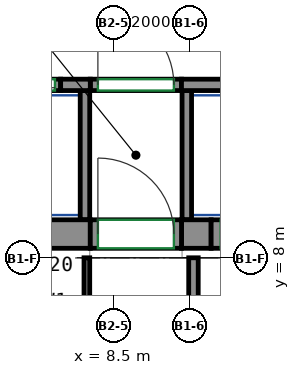
"""IFC4 building model, lengths in metres.
Left out: names, types, materials, properties, quantities, classifications, styles, units other than length and angle.
Written with IfcOpenShell. Run it as: python <this file> out.ifc"""

import sys

from ifc_helpers import new_model, si_unit, direction, frame, frame_2d, origin, place, context, subcontext, project, spatial, rectangle, extrude, source, transform, mapped, element, fill, save


model = new_model("IFC4")
c1 = context("Model", 3, precision=1e-05, world=origin(), true_north=direction((0.0, 1.0)))
c2 = subcontext(c1, "Body", "Model", "MODEL_VIEW")
j1 = project(units=[si_unit("LENGTHUNIT", "METRE"), si_unit("PLANEANGLEUNIT", "RADIAN")], contexts=[c1])
p1 = place(None, origin())
s1 = spatial("IfcSite", under=j1, at=p1, CompositionType="ELEMENT")
p2 = place(p1, origin())
s2 = spatial("IfcBuilding", under=s1, at=p2, CompositionType="ELEMENT")
p3 = place(p2, frame((0.0, 0.0, 203.3)))
s3 = spatial("IfcBuildingStorey", under=s2, at=p3, CompositionType="ELEMENT", Elevation=203.3)
m1 = source(origin(), c2, "Body", "SweptSolid", [
    extrude(rectangle(XDim=14.18, YDim=0.75, at=frame_2d((7.09, 0.0))), origin(), (0.0, 0.0, 1.0), 3.12),
])
p4 = place(p3, frame((-6.29, 8.625, 0.0), z_axis=(0.0, 0.0, 1.0), x_axis=(1.0, 0.0, 0.0)))
e1 = element("IfcWall", 1, at=p4, inside=s3, PredefinedType="SHEAR", context=c2, shape_type="MappedRepresentation", body=[
    mapped(m1, transform((0.0, 0.0, 0.0))),
])
m2 = source(origin(), c2, "Body", "SweptSolid", [
    extrude(rectangle(XDim=0.78, YDim=0.75, at=frame_2d((0.39, 0.0))), origin(), (0.0, 0.0, 1.0), 3.12),
])
p5 = place(p3, frame((10.29, 8.625, 0.0), z_axis=(0.0, 0.0, 1.0), x_axis=(1.0, 0.0, 0.0)))
e2 = element("IfcWall", 2, at=p5, inside=s3, PredefinedType="SHEAR", context=c2, shape_type="MappedRepresentation", body=[
    mapped(m2, transform((0.0, 0.0, 0.0))),
])
m3 = source(origin(), c2, "Body", "SweptSolid", [
    extrude(rectangle(XDim=0.78, YDim=0.3, at=frame_2d((0.39, 0.0))), origin(), (0.0, 0.0, 1.0), 3.12),
])
p6 = place(p3, frame((7.11, 12.55, 0.0), z_axis=(0.0, 0.0, 1.0), x_axis=(1.0, 0.0, 0.0)))
e3 = element("IfcWall", 3, at=p6, inside=s3, PredefinedType="SHEAR", context=c2, shape_type="MappedRepresentation", body=[
    mapped(m3, transform((0.0, 0.0, 0.0))),
])
m4 = source(origin(), c2, "Body", "SweptSolid", [
    extrude(rectangle(XDim=2.82, YDim=0.3, at=frame_2d((1.41, 0.0))), origin(), (0.0, 0.0, 1.0), 3.12),
])
p7 = place(p3, frame((10.29, 12.55, 0.0), z_axis=(0.0, 0.0, 1.0), x_axis=(1.0, 0.0, 0.0)))
e4 = element("IfcWall", 4, at=p7, inside=s3, PredefinedType="SHEAR", context=c2, shape_type="MappedRepresentation", body=[
    mapped(m4, transform((0.0, 0.0, 0.0))),
])
m5 = source(origin(), c2, "Body", "SweptSolid", [
    extrude(rectangle(XDim=1.4, YDim=0.3, at=frame_2d((0.7, 0.0))), origin(), (0.0, 0.0, 1.0), 3.12),
])
p8 = place(p3, frame((5.71, 12.55, 0.0), z_axis=(0.0, 0.0, 1.0), x_axis=(1.0, 0.0, 0.0)))
e5 = element("IfcWall", 5, at=p8, inside=s3, PredefinedType="PARTITIONING", context=c2, shape_type="MappedRepresentation", body=[
    mapped(m5, transform((0.0, 0.0, 0.0))),
])
p9 = place(p8, frame((0.15, 0.0, 0.0)))
e6 = element("IfcOpeningElement", 6, at=p9, cuts=e5, PredefinedType="OPENING", context=c2, shape_type="SweptSolid", body=[
    extrude(rectangle(XDim=1.1, YDim=2.1, at=frame_2d((0.55, 1.05))), frame((0.0, 0.16, 0.0), z_axis=(0.0, -1.0, 0.0), x_axis=(1.0, 0.0, 0.0)), (0.0, 0.0, 1.0), 0.32),
])
m6 = source(origin(), c2, "Body", "SweptSolid", [
    extrude(rectangle(XDim=2.4, YDim=0.3, at=frame_2d((1.2, 0.0))), origin(), (0.0, 0.0, 1.0), 3.12),
])
p10 = place(p3, frame((7.89, 12.55, 0.0), z_axis=(0.0, 0.0, 1.0), x_axis=(1.0, 0.0, 0.0)))
e7 = element("IfcWall", 7, at=p10, inside=s3, PredefinedType="PARTITIONING", context=c2, shape_type="MappedRepresentation", body=[
    mapped(m6, transform((0.0, 0.0, 0.0))),
])
p11 = place(p10, frame((0.2, 0.0, 0.0)))
e8 = element("IfcOpeningElement", 8, at=p11, cuts=e7, PredefinedType="OPENING", context=c2, shape_type="SweptSolid", body=[
    extrude(rectangle(XDim=2.0, YDim=2.1, at=frame_2d((1.0, 1.05))), frame((0.0, 0.16, 0.0), z_axis=(0.0, -1.0, 0.0), x_axis=(1.0, 0.0, 0.0)), (0.0, 0.0, 1.0), 0.32),
])
m7 = source(origin(), c2, "Body", "SweptSolid", [
    extrude(rectangle(XDim=2.65, YDim=0.25, at=frame_2d((1.325, 0.0))), origin(), (0.0, 0.0, 1.0), 3.12),
])
p12 = place(p3, frame((10.605, 5.35, 0.0), z_axis=(0.0, 0.0, 1.0), x_axis=(0.0, 1.0, 0.0)))
e9 = element("IfcWall", 9, at=p12, inside=s3, PredefinedType="PARTITIONING", context=c2, shape_type="MappedRepresentation", body=[
    mapped(m7, transform((0.0, 0.0, 0.0))),
])
m8 = source(origin(), c2, "Body", "SweptSolid", [
    extrude(rectangle(XDim=3.4, YDim=0.25, at=frame_2d((1.7, 0.0))), origin(), (0.0, 0.0, 1.0), 3.12),
])
for number, where, z_axis, x_axis in (
    (10, (10.43, 9.0, 0.0), (0.0, 0.0, 1.0), (0.0, 1.0, 0.0)),
    (11, (7.75, 9.0, 0.0), (0.0, 0.0, 1.0), (0.0, 1.0, 0.0)),
):
    element("IfcWall", number, at=place(p3, frame(where, z_axis=z_axis, x_axis=x_axis)), inside=s3, PredefinedType="PARTITIONING", context=c2, shape_type="MappedRepresentation", body=[
        mapped(m8, transform((0.0, 0.0, 0.0))),
    ])
m9 = source(origin(), c2, "Body", "SweptSolid", [
    extrude(rectangle(XDim=2.4, YDim=0.75, at=frame_2d((1.2, 0.0))), origin(), (0.0, 0.0, 1.0), 2.7),
])
p13 = place(p3, frame((7.89, 8.625, 0.0), z_axis=(0.0, 0.0, 1.0), x_axis=(1.0, 0.0, 0.0)))
e12 = element("IfcWall", 12, at=p13, inside=s3, PredefinedType="PARTITIONING", context=c2, shape_type="MappedRepresentation", body=[
    mapped(m9, transform((0.0, 0.0, 0.0))),
])
p14 = place(p13, frame((0.2, 0.0, 0.0)))
e13 = element("IfcOpeningElement", 13, at=p14, cuts=e12, PredefinedType="OPENING", context=c2, shape_type="SweptSolid", body=[
    extrude(rectangle(XDim=2.0, YDim=2.1, at=frame_2d((1.0, 1.05))), frame((0.0, 0.385, 0.0), z_axis=(0.0, -1.0, 0.0), x_axis=(1.0, 0.0, 0.0)), (0.0, 0.0, 1.0), 0.77),
])
m10 = source(origin(), c2, "Body", "SweptSolid", [
    extrude(rectangle(XDim=1.4, YDim=0.75, at=frame_2d((0.7, 0.0))), origin(), (0.0, 0.0, 1.0), 2.7),
])
p15 = place(p3, frame((11.07, 8.625, 0.0), z_axis=(0.0, 0.0, 1.0), x_axis=(1.0, 0.0, 0.0)))
e14 = element("IfcWall", 14, at=p15, inside=s3, PredefinedType="PARTITIONING", context=c2, shape_type="MappedRepresentation", body=[
    mapped(m10, transform((0.0, 0.0, 0.0))),
])
p16 = place(p15, frame((0.25, 0.0, 0.0)))
e15 = element("IfcOpeningElement", 15, at=p16, cuts=e14, PredefinedType="OPENING", context=c2, shape_type="SweptSolid", body=[
    extrude(rectangle(XDim=0.9, YDim=2.1, at=frame_2d((0.45, 1.05))), frame((0.0, 0.385, 0.0), z_axis=(0.0, -1.0, 0.0), x_axis=(1.0, 0.0, 0.0)), (0.0, 0.0, 1.0), 0.77),
])
p17 = place(p3, frame((7.8, 8.0, 0.0), z_axis=(0.0, 0.0, 1.0), x_axis=(0.0, -1.0, 0.0)))
e16 = element("IfcWall", 16, at=p17, inside=s3, PredefinedType="PARTITIONING", context=c2, shape_type="SweptSolid", body=[
    extrude(rectangle(XDim=2.325, YDim=0.15, at=frame_2d((1.163, 0.0))), origin(), (0.0, 0.0, 1.0), 3.12),
])
p18 = place(p11, origin())
e17 = element("IfcDoor", 17, at=p18, inside=s3, OperationType="DOUBLE_DOOR_SINGLE_SWING", PredefinedType="DOOR", context=c2, shape_type="SweptSolid", body=[
    extrude(rectangle(XDim=2.0, YDim=2.1, at=frame_2d((1.0, 1.05))), frame((0.0, 0.025, 0.0), z_axis=(0.0, -1.0, 0.0), x_axis=(1.0, 0.0, 0.0)), (0.0, 0.0, 1.0), 0.05),
])
fill(e8, e17)
p19 = place(p14, origin())
e18 = element("IfcDoor", 18, at=p19, inside=s3, OperationType="DOUBLE_DOOR_SINGLE_SWING", PredefinedType="DOOR", context=c2, shape_type="SweptSolid", body=[
    extrude(rectangle(XDim=2.0, YDim=2.1, at=frame_2d((1.0, 1.05))), frame((0.0, 0.28, 0.0), z_axis=(0.0, -1.0, 0.0), x_axis=(1.0, 0.0, 0.0)), (0.0, 0.0, 1.0), 0.05),
])
fill(e13, e18)
p20 = place(p9, origin())
e19 = element("IfcDoor", 19, at=p20, inside=s3, OperationType="DOUBLE_DOOR_SLIDING", PredefinedType="DOOR", context=c2, shape_type="SweptSolid", body=[
    extrude(rectangle(XDim=1.1, YDim=2.1, at=frame_2d((0.55, 1.05))), frame((0.0, 0.025, 0.0), z_axis=(0.0, -1.0, 0.0), x_axis=(1.0, 0.0, 0.0)), (0.0, 0.0, 1.0), 0.05),
])
fill(e6, e19)
save(model, sys.argv[1])
